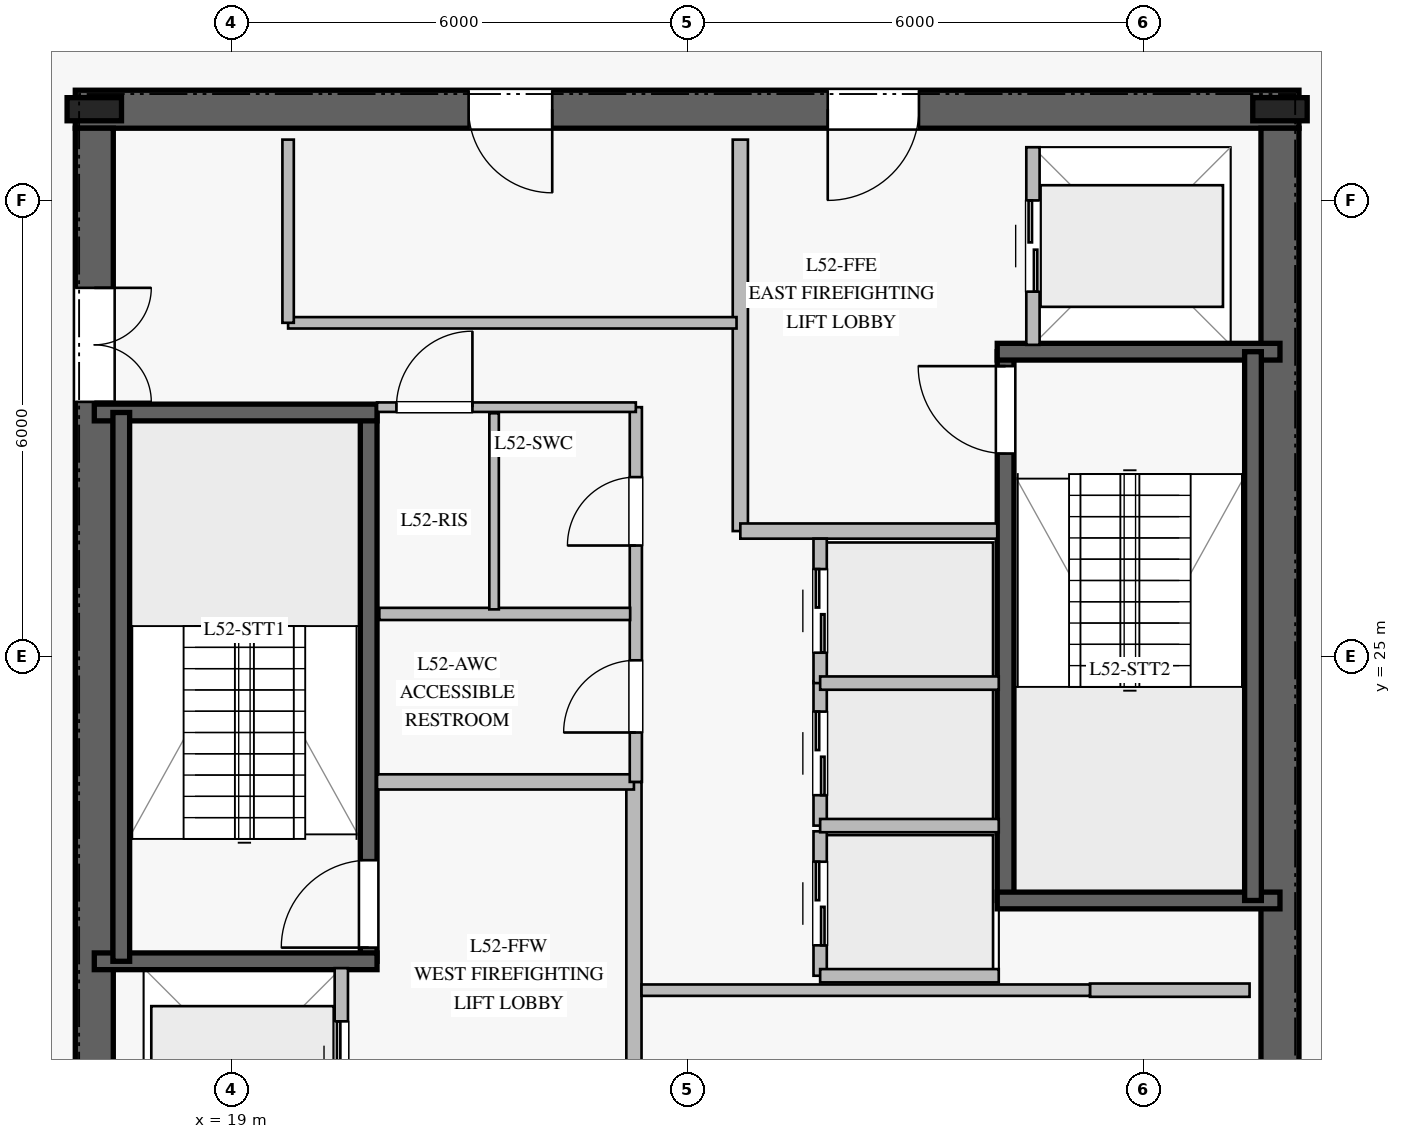
"""IFC4 building model, lengths in metres.
Left out: names, types, materials, properties, quantities, classifications, styles, units other than length and angle.
Written with IfcOpenShell. Run it as: python <this file> out.ifc"""

import sys

from ifc_helpers import new_model, si_unit, direction, frame, frame_2d, origin, origin_2d, place, context, subcontext, project, spatial, rectangle, i_section, extrude, element, fill, save


model = new_model("IFC4")
c1 = context("Model", 3, precision=1e-05, world=origin(), true_north=direction((0.0, 1.0)))
c2 = subcontext(c1, "Body", "Model", "MODEL_VIEW")
j1 = project(units=[si_unit("LENGTHUNIT", "METRE"), si_unit("PLANEANGLEUNIT", "RADIAN")], contexts=[c1])
p1 = place(None, origin())
s1 = spatial("IfcSite", under=j1, at=p1, CompositionType="ELEMENT")
p2 = place(p1, origin())
s2 = spatial("IfcBuilding", under=s1, at=p2, CompositionType="ELEMENT")
p3 = place(p2, frame((0.0, 0.0, 216.8)))
s3 = spatial("IfcBuildingStorey", under=s2, at=p3, CompositionType="ELEMENT", Elevation=216.8)
p4 = place(p3, frame((33.05, 32.2, 0.0), z_axis=(0.0, 0.0, 1.0), x_axis=(-1.0, 0.0, 0.0)))
e1 = element("IfcWall", 1, at=p4, inside=s3, PredefinedType="SHEAR", context=c2, shape_type="SweptSolid", body=[
    extrude(rectangle(XDim=16.1, YDim=0.5, at=frame_2d((8.05, 0.0))), origin(), (0.0, 0.0, 1.0), 3.78),
])
p5 = place(p4, frame((5.0, 0.0, 0.0)))
e2 = element("IfcOpeningElement", 2, at=p5, cuts=e1, PredefinedType="OPENING", context=c2, shape_type="SweptSolid", body=[
    extrude(rectangle(XDim=1.2, YDim=2.25, at=frame_2d((0.6, 1.125))), frame((0.0, 0.26, 0.0), z_axis=(0.0, -1.0, 0.0), x_axis=(1.0, 0.0, 0.0)), (0.0, 0.0, 1.0), 0.52),
])
p6 = place(p4, frame((9.825, 0.0, 0.0)))
e3 = element("IfcOpeningElement", 3, at=p6, cuts=e1, PredefinedType="OPENING", context=c2, shape_type="SweptSolid", body=[
    extrude(rectangle(XDim=1.1, YDim=2.2, at=frame_2d((0.55, 1.1))), frame((0.0, 0.26, 0.0), z_axis=(0.0, -1.0, 0.0), x_axis=(1.0, 0.0, 0.0)), (0.0, 0.0, 1.0), 0.52),
])
p7 = place(p3, frame((17.2, 31.95, 0.0), z_axis=(0.0, 0.0, 1.0), x_axis=(0.0, -1.0, 0.0)))
e4 = element("IfcWall", 4, at=p7, inside=s3, PredefinedType="SHEAR", context=c2, shape_type="SweptSolid", body=[
    extrude(rectangle(XDim=13.9, YDim=0.5, at=frame_2d((6.95, 0.0))), origin(), (0.0, 0.0, 1.0), 3.78),
])
p8 = place(p7, frame((2.1, 0.0, 0.0)))
e5 = element("IfcOpeningElement", 5, at=p8, cuts=e4, PredefinedType="OPENING", context=c2, shape_type="SweptSolid", body=[
    extrude(rectangle(XDim=1.5, YDim=2.2, at=frame_2d((0.75, 1.1))), frame((0.0, 0.26, 0.0), z_axis=(0.0, -1.0, 0.0), x_axis=(1.0, 0.0, 0.0)), (0.0, 0.0, 1.0), 0.52),
])
p9 = place(p3, frame((32.8, 18.05, 0.0), z_axis=(0.0, 0.0, 1.0), x_axis=(0.0, 1.0, 0.0)))
e6 = element("IfcWall", 6, at=p9, inside=s3, PredefinedType="SHEAR", context=c2, shape_type="SweptSolid", body=[
    extrude(rectangle(XDim=13.9, YDim=0.5, at=frame_2d((6.95, 0.0))), origin(), (0.0, 0.0, 1.0), 3.78),
])
for number, where, z_axis, x_axis in (
    (7, (32.8, 32.2, 0.0), (0.0, 0.0, 1.0), (1.0, 0.0, 0.0)),
    (8, (17.2, 32.2, 0.0), (0.0, 0.0, 1.0), (1.0, 0.0, 0.0)),
):
    element("IfcColumn", number, at=place(p3, frame(where, z_axis=z_axis, x_axis=x_axis)), inside=s3, PredefinedType="COLUMN", context=c2, shape_type="SweptSolid", body=[
        extrude(i_section(OverallWidth=0.304, OverallDepth=0.716, WebThickness=0.021, FlangeThickness=0.04, at=origin_2d()), origin(), (0.0, 0.0, 1.0), 4.0),
    ])
p10 = place(p3, frame((20.81, 20.99, 0.0), z_axis=(0.0, 0.0, 1.0), x_axis=(0.0, 1.0, 0.0)))
e9 = element("IfcWall", 9, at=p10, inside=s3, PredefinedType="SOLIDWALL", context=c2, shape_type="SweptSolid", body=[
    extrude(rectangle(XDim=7.22, YDim=0.22, at=frame_2d((3.61, 0.0))), origin(), (0.0, 0.0, 1.0), 3.78),
])
p11 = place(p10, frame((0.18, 0.0, 0.0)))
e10 = element("IfcOpeningElement", 10, at=p11, cuts=e9, PredefinedType="OPENING", context=c2, shape_type="SweptSolid", body=[
    extrude(rectangle(XDim=1.15, YDim=2.2, at=frame_2d((0.575, 1.1))), frame((0.0, 0.12, 0.0), z_axis=(0.0, -1.0, 0.0), x_axis=(1.0, 0.0, 0.0)), (0.0, 0.0, 1.0), 0.24),
])
for number, where, z_axis, x_axis in (
    (11, (17.2, 20.99, 0.0), (0.0, 0.0, 1.0), (1.0, 0.0, 0.0)),
    (12, (17.2, 28.21, 0.0), (0.0, 0.0, 1.0), (1.0, 0.0, 0.0)),
):
    element("IfcWall", number, at=place(p3, frame(where, z_axis=z_axis, x_axis=x_axis)), inside=s3, PredefinedType="SOLIDWALL", context=c2, shape_type="SweptSolid", body=[
        extrude(rectangle(XDim=3.72, YDim=0.22, at=frame_2d((1.86, 0.0))), origin(), (0.0, 0.0, 1.0), 3.78),
    ])
p12 = place(p3, frame((17.555, 28.21, 0.0), z_axis=(0.0, 0.0, 1.0), x_axis=(0.0, -1.0, 0.0)))
e13 = element("IfcWall", 13, at=p12, inside=s3, PredefinedType="SOLIDWALL", context=c2, shape_type="SweptSolid", body=[
    extrude(rectangle(XDim=7.22, YDim=0.22, at=frame_2d((3.61, 0.0))), origin(), (0.0, 0.0, 1.0), 3.78),
])
p13 = place(p3, frame((29.19, 21.79, 0.0), z_axis=(0.0, 0.0, 1.0), x_axis=(0.0, 1.0, 0.0)))
e14 = element("IfcWall", 14, at=p13, inside=s3, PredefinedType="SOLIDWALL", context=c2, shape_type="SweptSolid", body=[
    extrude(rectangle(XDim=7.22, YDim=0.22, at=frame_2d((3.61, 0.0))), origin(), (0.0, 0.0, 1.0), 3.78),
])
p14 = place(p13, frame((5.88, 0.0, 0.0)))
e15 = element("IfcOpeningElement", 15, at=p14, cuts=e14, PredefinedType="OPENING", context=c2, shape_type="SweptSolid", body=[
    extrude(rectangle(XDim=1.15, YDim=2.2, at=frame_2d((0.575, 1.1))), frame((0.0, 0.12, 0.0), z_axis=(0.0, -1.0, 0.0), x_axis=(1.0, 0.0, 0.0)), (0.0, 0.0, 1.0), 0.24),
])
for number, where, z_axis, x_axis in (
    (16, (29.08, 21.79, 0.0), (0.0, 0.0, 1.0), (1.0, 0.0, 0.0)),
    (17, (29.08, 29.01, 0.0), (0.0, 0.0, 1.0), (1.0, 0.0, 0.0)),
):
    element("IfcWall", number, at=place(p3, frame(where, z_axis=z_axis, x_axis=x_axis)), inside=s3, PredefinedType="SOLIDWALL", context=c2, shape_type="SweptSolid", body=[
        extrude(rectangle(XDim=3.72, YDim=0.22, at=frame_2d((1.86, 0.0))), origin(), (0.0, 0.0, 1.0), 3.78),
    ])
p15 = place(p3, frame((32.445, 29.01, 0.0), z_axis=(0.0, 0.0, 1.0), x_axis=(0.0, -1.0, 0.0)))
e18 = element("IfcWall", 18, at=p15, inside=s3, PredefinedType="SOLIDWALL", context=c2, shape_type="SweptSolid", body=[
    extrude(rectangle(XDim=7.22, YDim=0.22, at=frame_2d((3.61, 0.0))), origin(), (0.0, 0.0, 1.0), 3.78),
])
p16 = place(p3, frame((24.3, 18.2, 0.0), z_axis=(0.0, 0.0, 1.0), x_axis=(0.0, 1.0, 0.0)))
e19 = element("IfcWall", 19, at=p16, inside=s3, PredefinedType="PARTITIONING", context=c2, shape_type="SweptSolid", body=[
    extrude(rectangle(XDim=5.15, YDim=0.2, at=frame_2d((2.575, 0.0))), origin(), (0.0, 0.0, 1.0), 3.78),
])
p17 = place(p3, frame((20.92, 23.35, 0.0), z_axis=(0.0, 0.0, 1.0), x_axis=(1.0, 0.0, 0.0)))
e20 = element("IfcWall", 20, at=p17, inside=s3, PredefinedType="PARTITIONING", context=c2, shape_type="SweptSolid", body=[
    extrude(rectangle(XDim=3.38, YDim=0.2, at=frame_2d((1.69, 0.0))), origin(), (0.0, 0.0, 1.0), 3.78),
])
p18 = place(p3, frame((25.7, 26.65, 0.0), z_axis=(0.0, 0.0, 1.0), x_axis=(0.0, 1.0, 0.0)))
e21 = element("IfcWall", 21, at=p18, inside=s3, PredefinedType="PARTITIONING", context=c2, shape_type="SweptSolid", body=[
    extrude(rectangle(XDim=5.15, YDim=0.2, at=frame_2d((2.575, 0.0))), origin(), (0.0, 0.0, 1.0), 3.78),
])
p19 = place(p3, frame((25.7, 26.65, 0.0), z_axis=(0.0, 0.0, 1.0), x_axis=(1.0, 0.0, 0.0)))
e22 = element("IfcWall", 22, at=p19, inside=s3, PredefinedType="PARTITIONING", context=c2, shape_type="SweptSolid", body=[
    extrude(rectangle(XDim=3.38, YDim=0.2, at=frame_2d((1.69, 0.0))), origin(), (0.0, 0.0, 1.0), 3.78),
])
p20 = place(p3, frame((24.325, 23.35, 0.0), z_axis=(0.0, 0.0, 1.0), x_axis=(0.0, 1.0, 0.0)))
e23 = element("IfcWall", 23, at=p20, inside=s3, PredefinedType="PLUMBINGWALL", context=c2, shape_type="SweptSolid", body=[
    extrude(rectangle(XDim=4.93, YDim=0.16, at=frame_2d((2.465, 0.0))), origin(), (0.0, 0.0, 1.0), 3.78),
])
p21 = place(p20, frame((0.65, 0.0, 0.0)))
e24 = element("IfcOpeningElement", 24, at=p21, cuts=e23, PredefinedType="OPENING", context=c2, shape_type="SweptSolid", body=[
    extrude(rectangle(XDim=0.95, YDim=2.1, at=frame_2d((0.475, 1.05))), frame((0.0, 0.09, 0.0), z_axis=(0.0, -1.0, 0.0), x_axis=(1.0, 0.0, 0.0)), (0.0, 0.0, 1.0), 0.18),
])
p22 = place(p20, frame((3.11, 0.0, 0.0)))
e25 = element("IfcOpeningElement", 25, at=p22, cuts=e23, PredefinedType="OPENING", context=c2, shape_type="SweptSolid", body=[
    extrude(rectangle(XDim=0.9, YDim=2.1, at=frame_2d((0.45, 1.05))), frame((0.0, 0.09, 0.0), z_axis=(0.0, -1.0, 0.0), x_axis=(1.0, 0.0, 0.0)), (0.0, 0.0, 1.0), 0.18),
])
p23 = place(p3, frame((20.92, 28.28, 0.0), z_axis=(0.0, 0.0, 1.0), x_axis=(1.0, 0.0, 0.0)))
e26 = element("IfcWall", 26, at=p23, inside=s3, PredefinedType="PARTITIONING", context=c2, shape_type="SweptSolid", body=[
    extrude(rectangle(XDim=3.405, YDim=0.125, at=frame_2d((1.703, 0.0))), origin(), (0.0, 0.0, 1.0), 3.78),
])
p24 = place(p23, frame((0.255, 0.0, 0.0)))
e27 = element("IfcOpeningElement", 27, at=p24, cuts=e26, PredefinedType="OPENING", context=c2, shape_type="SweptSolid", body=[
    extrude(rectangle(XDim=1.0, YDim=2.15, at=frame_2d((0.5, 1.075))), frame((0.0, 0.073, 0.0), z_axis=(0.0, -1.0, 0.0), x_axis=(1.0, 0.0, 0.0)), (0.0, 0.0, 1.0), 0.145),
])
p25 = place(p3, frame((20.95, 25.56, 0.0), z_axis=(0.0, 0.0, 1.0), x_axis=(1.0, 0.0, 0.0)))
e28 = element("IfcWall", 28, at=p25, inside=s3, PredefinedType="PLUMBINGWALL", context=c2, shape_type="SweptSolid", body=[
    extrude(rectangle(XDim=3.3, YDim=0.16, at=frame_2d((1.65, 0.0))), origin(), (0.0, 0.0, 1.0), 3.78),
])
p26 = place(p3, frame((22.46, 25.62, 0.0), z_axis=(0.0, 0.0, 1.0), x_axis=(0.0, 1.0, 0.0)))
e29 = element("IfcWall", 29, at=p26, inside=s3, PredefinedType="PARTITIONING", context=c2, shape_type="SweptSolid", body=[
    extrude(rectangle(XDim=2.58, YDim=0.125, at=frame_2d((1.29, 0.0))), origin(), (0.0, 0.0, 1.0), 3.78),
])
p27 = place(p3, frame((30.3, 20.61, 0.0), z_axis=(0.0, 0.0, 1.0), x_axis=(1.0, 0.0, 0.0)))
e30 = element("IfcWall", 30, at=p27, inside=s3, PredefinedType="PARTITIONING", context=c2, shape_type="SweptSolid", body=[
    extrude(rectangle(XDim=2.1, YDim=0.175, at=frame_2d((1.05, 0.0))), origin(), (0.0, 0.0, 1.0), 3.78),
])
p28 = place(p3, frame((24.4, 20.61, 0.0), z_axis=(0.0, 0.0, 1.0), x_axis=(1.0, 0.0, 0.0)))
e31 = element("IfcWall", 31, at=p28, inside=s3, PredefinedType="PARTITIONING", context=c2, shape_type="SweptSolid", body=[
    extrude(rectangle(XDim=5.9, YDim=0.15, at=frame_2d((2.95, 0.0))), origin(), (0.0, 0.0, 1.0), 3.78),
])
p29 = place(p3, frame((19.75, 29.39, 0.0), z_axis=(0.0, 0.0, 1.0), x_axis=(1.0, 0.0, 0.0)))
e32 = element("IfcWall", 32, at=p29, inside=s3, PredefinedType="PARTITIONING", context=c2, shape_type="SweptSolid", body=[
    extrude(rectangle(XDim=5.9, YDim=0.15, at=frame_2d((2.95, 0.0))), origin(), (0.0, 0.0, 1.0), 3.78),
])
p30 = place(p3, frame((19.75, 29.39, 0.0), z_axis=(0.0, 0.0, 1.0), x_axis=(0.0, 1.0, 0.0)))
e33 = element("IfcWall", 33, at=p30, inside=s3, PredefinedType="PARTITIONING", context=c2, shape_type="SweptSolid", body=[
    extrude(rectangle(XDim=2.41, YDim=0.15, at=frame_2d((1.205, 0.0))), origin(), (0.0, 0.0, 1.0), 3.78),
])
p31 = place(p3, frame((26.75, 20.8, 0.0), z_axis=(0.0, 0.0, 1.0), x_axis=(0.0, 1.0, 0.0)))
e34 = element("IfcWall", 34, at=p31, inside=s3, PredefinedType="PARTITIONING", context=c2, shape_type="SweptSolid", body=[
    extrude(rectangle(XDim=1.9, YDim=0.175, at=frame_2d((0.95, 0.0))), origin(), (0.0, 0.0, 1.0), 3.78),
])
p32 = place(p31, frame((0.4, 0.0, 0.0)))
e35 = element("IfcOpeningElement", 35, at=p32, cuts=e34, PredefinedType="OPENING", context=c2, shape_type="SweptSolid", body=[
    extrude(rectangle(XDim=1.1, YDim=2.2, at=frame_2d((0.55, 1.1))), frame((0.0, 0.098, 0.0), z_axis=(0.0, -1.0, 0.0), x_axis=(1.0, 0.0, 0.0)), (0.0, 0.0, 1.0), 0.195),
])
p33 = place(p3, frame((26.75, 20.8, 0.0), z_axis=(0.0, 0.0, 1.0), x_axis=(1.0, 0.0, 0.0)))
e36 = element("IfcWall", 36, at=p33, inside=s3, PredefinedType="PARTITIONING", context=c2, shape_type="SweptSolid", body=[
    extrude(rectangle(XDim=2.35, YDim=0.175, at=frame_2d((1.175, 0.0))), origin(), (0.0, 0.0, 1.0), 3.78),
])
p34 = place(p3, frame((26.75, 22.775, 0.0), z_axis=(0.0, 0.0, 1.0), x_axis=(0.0, 1.0, 0.0)))
e37 = element("IfcWall", 37, at=p34, inside=s3, PredefinedType="PARTITIONING", context=c2, shape_type="SweptSolid", body=[
    extrude(rectangle(XDim=1.9, YDim=0.175, at=frame_2d((0.95, 0.0))), origin(), (0.0, 0.0, 1.0), 3.78),
])
p35 = place(p34, frame((0.4, 0.0, 0.0)))
e38 = element("IfcOpeningElement", 38, at=p35, cuts=e37, PredefinedType="OPENING", context=c2, shape_type="SweptSolid", body=[
    extrude(rectangle(XDim=1.1, YDim=2.2, at=frame_2d((0.55, 1.1))), frame((0.0, 0.098, 0.0), z_axis=(0.0, -1.0, 0.0), x_axis=(1.0, 0.0, 0.0)), (0.0, 0.0, 1.0), 0.195),
])
p36 = place(p3, frame((26.75, 22.775, 0.0), z_axis=(0.0, 0.0, 1.0), x_axis=(1.0, 0.0, 0.0)))
e39 = element("IfcWall", 39, at=p36, inside=s3, PredefinedType="PARTITIONING", context=c2, shape_type="SweptSolid", body=[
    extrude(rectangle(XDim=2.35, YDim=0.175, at=frame_2d((1.175, 0.0))), origin(), (0.0, 0.0, 1.0), 3.78),
])
p37 = place(p3, frame((26.75, 24.65, 0.0), z_axis=(0.0, 0.0, 1.0), x_axis=(0.0, 1.0, 0.0)))
e40 = element("IfcWall", 40, at=p37, inside=s3, PredefinedType="PARTITIONING", context=c2, shape_type="SweptSolid", body=[
    extrude(rectangle(XDim=1.9, YDim=0.175, at=frame_2d((0.95, 0.0))), origin(), (0.0, 0.0, 1.0), 3.78),
])
p38 = place(p37, frame((0.4, 0.0, 0.0)))
e41 = element("IfcOpeningElement", 41, at=p38, cuts=e40, PredefinedType="OPENING", context=c2, shape_type="SweptSolid", body=[
    extrude(rectangle(XDim=1.1, YDim=2.2, at=frame_2d((0.55, 1.1))), frame((0.0, 0.098, 0.0), z_axis=(0.0, -1.0, 0.0), x_axis=(1.0, 0.0, 0.0)), (0.0, 0.0, 1.0), 0.195),
])
p39 = place(p3, frame((26.75, 24.65, 0.0), z_axis=(0.0, 0.0, 1.0), x_axis=(1.0, 0.0, 0.0)))
e42 = element("IfcWall", 42, at=p39, inside=s3, PredefinedType="PARTITIONING", context=c2, shape_type="SweptSolid", body=[
    extrude(rectangle(XDim=2.35, YDim=0.175, at=frame_2d((1.175, 0.0))), origin(), (0.0, 0.0, 1.0), 3.78),
])
p40 = place(p3, frame((20.45, 18.3, 0.0), z_axis=(0.0, 0.0, 1.0), x_axis=(0.0, 1.0, 0.0)))
e43 = element("IfcWall", 43, at=p40, inside=s3, PredefinedType="PARTITIONING", context=c2, shape_type="SweptSolid", body=[
    extrude(rectangle(XDim=2.6, YDim=0.175, at=frame_2d((1.3, 0.0))), origin(), (0.0, 0.0, 1.0), 3.78),
])
p41 = place(p40, frame((0.7, 0.0, 0.0)))
e44 = element("IfcOpeningElement", 44, at=p41, cuts=e43, PredefinedType="OPENING", context=c2, shape_type="SweptSolid", body=[
    extrude(rectangle(XDim=1.2, YDim=2.2, at=frame_2d((0.6, 1.1))), frame((0.0, 0.098, 0.0), z_axis=(0.0, -1.0, 0.0), x_axis=(1.0, 0.0, 0.0)), (0.0, 0.0, 1.0), 0.195),
])
p42 = place(p3, frame((29.55, 29.1, 0.0), z_axis=(0.0, 0.0, 1.0), x_axis=(0.0, 1.0, 0.0)))
e45 = element("IfcWall", 45, at=p42, inside=s3, PredefinedType="PARTITIONING", context=c2, shape_type="SweptSolid", body=[
    extrude(rectangle(XDim=2.6, YDim=0.175, at=frame_2d((1.3, 0.0))), origin(), (0.0, 0.0, 1.0), 3.78),
])
p43 = place(p42, frame((0.7, 0.0, 0.0)))
e46 = element("IfcOpeningElement", 46, at=p43, cuts=e45, PredefinedType="OPENING", context=c2, shape_type="SweptSolid", body=[
    extrude(rectangle(XDim=1.2, YDim=2.2, at=frame_2d((0.6, 1.1))), frame((0.0, 0.098, 0.0), z_axis=(0.0, -1.0, 0.0), x_axis=(1.0, 0.0, 0.0)), (0.0, 0.0, 1.0), 0.195),
])
p44 = place(p11, origin())
e47 = element("IfcDoor", 47, at=p44, inside=s3, OperationType="SINGLE_SWING_LEFT", PredefinedType="DOOR", context=c2, shape_type="SweptSolid", body=[
    extrude(rectangle(XDim=1.15, YDim=2.2, at=frame_2d((0.575, 1.1))), frame((0.0, 0.025, 0.0), z_axis=(0.0, -1.0, 0.0), x_axis=(1.0, 0.0, 0.0)), (0.0, 0.0, 1.0), 0.05),
])
fill(e10, e47)
p45 = place(p14, origin())
e48 = element("IfcDoor", 48, at=p45, inside=s3, OperationType="SINGLE_SWING_RIGHT", PredefinedType="DOOR", context=c2, shape_type="SweptSolid", body=[
    extrude(rectangle(XDim=1.15, YDim=2.2, at=frame_2d((0.575, 1.1))), frame((0.0, 0.025, 0.0), z_axis=(0.0, -1.0, 0.0), x_axis=(1.0, 0.0, 0.0)), (0.0, 0.0, 1.0), 0.05),
])
fill(e15, e48)
p46 = place(p5, origin())
e49 = element("IfcDoor", 49, at=p46, inside=s3, OperationType="SINGLE_SWING_RIGHT", PredefinedType="DOOR", context=c2, shape_type="SweptSolid", body=[
    extrude(rectangle(XDim=1.2, YDim=2.25, at=frame_2d((0.6, 1.125))), frame((0.0, 0.025, 0.0), z_axis=(0.0, -1.0, 0.0), x_axis=(1.0, 0.0, 0.0)), (0.0, 0.0, 1.0), 0.05),
])
fill(e2, e49)
p47 = place(p8, origin())
e50 = element("IfcDoor", 50, at=p47, inside=s3, OperationType="DOUBLE_DOOR_SINGLE_SWING", PredefinedType="DOOR", context=c2, shape_type="SweptSolid", body=[
    extrude(rectangle(XDim=1.5, YDim=2.2, at=frame_2d((0.75, 1.1))), frame((0.0, 0.025, 0.0), z_axis=(0.0, -1.0, 0.0), x_axis=(1.0, 0.0, 0.0)), (0.0, 0.0, 1.0), 0.05),
])
fill(e5, e50)
p48 = place(p21, origin())
e51 = element("IfcDoor", 51, at=p48, inside=s3, OperationType="SINGLE_SWING_LEFT", PredefinedType="DOOR", context=c2, shape_type="SweptSolid", body=[
    extrude(rectangle(XDim=0.95, YDim=2.1, at=frame_2d((0.475, 1.05))), frame((0.0, 0.025, 0.0), z_axis=(0.0, -1.0, 0.0), x_axis=(1.0, 0.0, 0.0)), (0.0, 0.0, 1.0), 0.05),
])
fill(e24, e51)
p49 = place(p24, origin())
e52 = element("IfcDoor", 52, at=p49, inside=s3, OperationType="SINGLE_SWING_RIGHT", PredefinedType="DOOR", context=c2, shape_type="SweptSolid", body=[
    extrude(rectangle(XDim=1.0, YDim=2.15, at=frame_2d((0.5, 1.075))), frame((0.0, 0.025, 0.0), z_axis=(0.0, -1.0, 0.0), x_axis=(1.0, 0.0, 0.0)), (0.0, 0.0, 1.0), 0.05),
])
fill(e27, e52)
p50 = place(p22, origin())
e53 = element("IfcDoor", 53, at=p50, inside=s3, OperationType="SINGLE_SWING_LEFT", PredefinedType="DOOR", context=c2, shape_type="SweptSolid", body=[
    extrude(rectangle(XDim=0.9, YDim=2.1, at=frame_2d((0.45, 1.05))), frame((0.0, 0.025, 0.0), z_axis=(0.0, -1.0, 0.0), x_axis=(1.0, 0.0, 0.0)), (0.0, 0.0, 1.0), 0.05),
])
fill(e25, e53)
p51 = place(p6, origin())
e54 = element("IfcDoor", 54, at=p51, inside=s3, OperationType="SINGLE_SWING_LEFT", PredefinedType="DOOR", context=c2, shape_type="SweptSolid", body=[
    extrude(rectangle(XDim=1.1, YDim=2.2, at=frame_2d((0.55, 1.1))), frame((0.0, 0.025, 0.0), z_axis=(0.0, -1.0, 0.0), x_axis=(1.0, 0.0, 0.0)), (0.0, 0.0, 1.0), 0.05),
])
fill(e3, e54)
p52 = place(p32, origin())
e55 = element("IfcDoor", 55, at=p52, inside=s3, OperationType="DOUBLE_DOOR_SLIDING", PredefinedType="DOOR", context=c2, shape_type="SweptSolid", body=[
    extrude(rectangle(XDim=1.1, YDim=2.2, at=frame_2d((0.55, 1.1))), frame((0.0, 0.025, 0.0), z_axis=(0.0, -1.0, 0.0), x_axis=(1.0, 0.0, 0.0)), (0.0, 0.0, 1.0), 0.05),
])
fill(e35, e55)
p53 = place(p35, origin())
e56 = element("IfcDoor", 56, at=p53, inside=s3, OperationType="DOUBLE_DOOR_SLIDING", PredefinedType="DOOR", context=c2, shape_type="SweptSolid", body=[
    extrude(rectangle(XDim=1.1, YDim=2.2, at=frame_2d((0.55, 1.1))), frame((0.0, 0.025, 0.0), z_axis=(0.0, -1.0, 0.0), x_axis=(1.0, 0.0, 0.0)), (0.0, 0.0, 1.0), 0.05),
])
fill(e38, e56)
p54 = place(p38, origin())
e57 = element("IfcDoor", 57, at=p54, inside=s3, OperationType="DOUBLE_DOOR_SLIDING", PredefinedType="DOOR", context=c2, shape_type="SweptSolid", body=[
    extrude(rectangle(XDim=1.1, YDim=2.2, at=frame_2d((0.55, 1.1))), frame((0.0, 0.025, 0.0), z_axis=(0.0, -1.0, 0.0), x_axis=(1.0, 0.0, 0.0)), (0.0, 0.0, 1.0), 0.05),
])
fill(e41, e57)
p55 = place(p41, origin())
e58 = element("IfcDoor", 58, at=p55, inside=s3, OperationType="DOUBLE_DOOR_SLIDING", PredefinedType="DOOR", context=c2, shape_type="SweptSolid", body=[
    extrude(rectangle(XDim=1.2, YDim=2.2, at=frame_2d((0.6, 1.1))), frame((0.0, 0.025, 0.0), z_axis=(0.0, -1.0, 0.0), x_axis=(1.0, 0.0, 0.0)), (0.0, 0.0, 1.0), 0.05),
])
fill(e44, e58)
p56 = place(p43, origin())
e59 = element("IfcDoor", 59, at=p56, inside=s3, OperationType="DOUBLE_DOOR_SLIDING", PredefinedType="DOOR", context=c2, shape_type="SweptSolid", body=[
    extrude(rectangle(XDim=1.2, YDim=2.2, at=frame_2d((0.6, 1.1))), frame((0.0, 0.025, 0.0), z_axis=(0.0, -1.0, 0.0), x_axis=(1.0, 0.0, 0.0)), (0.0, 0.0, 1.0), 0.05),
])
fill(e46, e59)
save(model, sys.argv[1])
